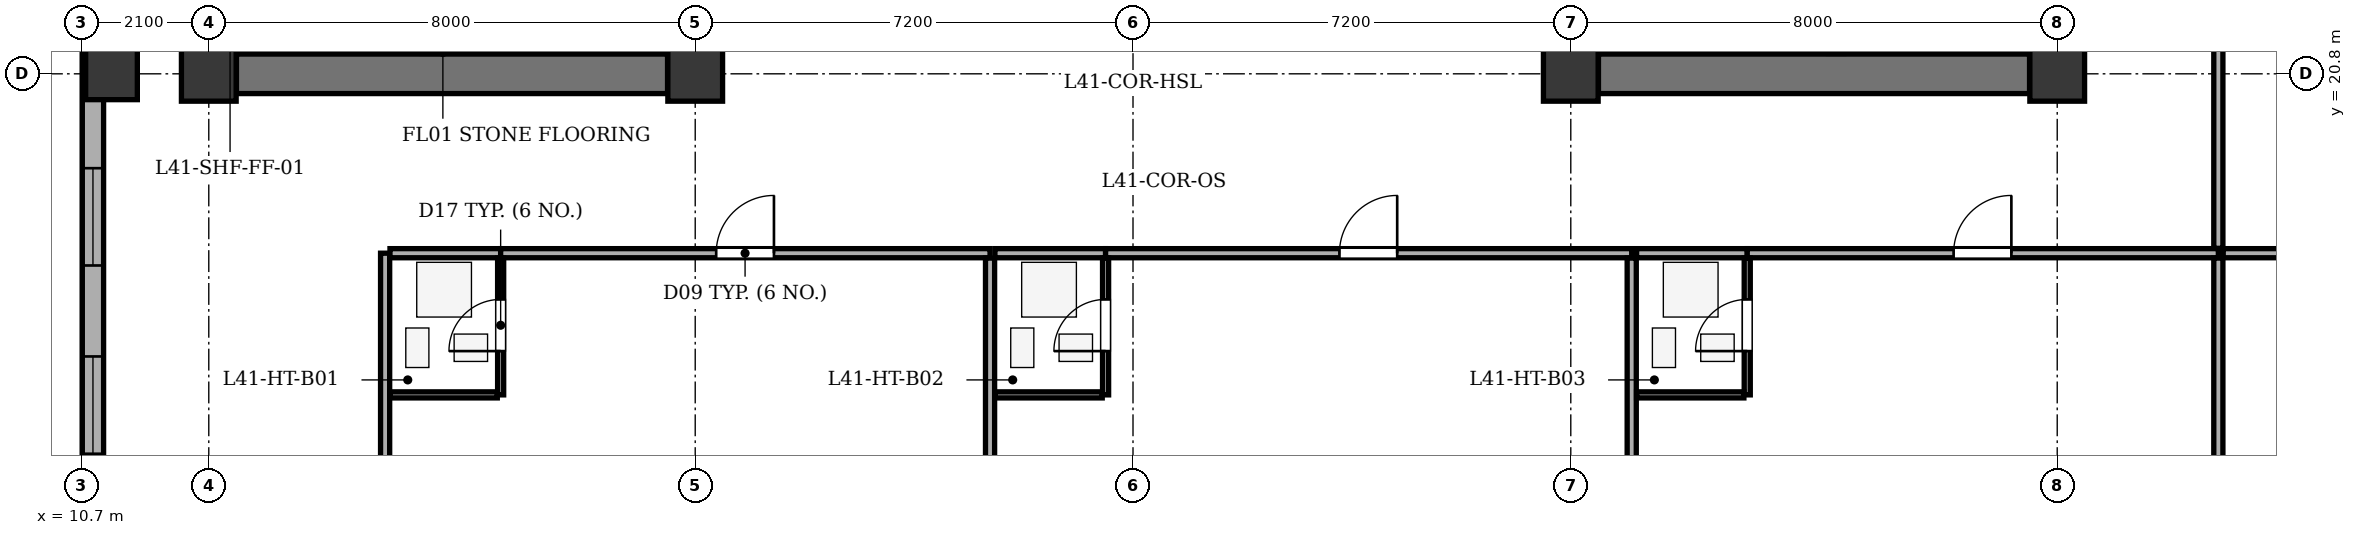
"""IFC4 building model, lengths in metres.
Left out: names, types, materials, properties, quantities, classifications, styles, units other than length and angle.
Written with IfcOpenShell. Run it as: python <this file> out.ifc"""

import sys

from ifc_helpers import new_model, si_unit, direction, frame, frame_2d, origin, origin_2d, place, context, subcontext, project, spatial, rectangle, extrude, element, fill, save


model = new_model("IFC4")
c1 = context("Model", 3, precision=1e-05, world=origin(), true_north=direction((0.0, 1.0)))
c2 = subcontext(c1, "Body", "Model", "MODEL_VIEW")
j1 = project(units=[si_unit("LENGTHUNIT", "METRE"), si_unit("PLANEANGLEUNIT", "RADIAN")], contexts=[c1])
p1 = place(None, origin())
s1 = spatial("IfcSite", under=j1, at=p1, CompositionType="ELEMENT")
p2 = place(p1, origin())
s2 = spatial("IfcBuilding", under=s1, at=p2, CompositionType="ELEMENT")
p3 = place(p2, frame((0.0, 0.0, 162.3)))
s3 = spatial("IfcBuildingStorey", under=s2, at=p3, CompositionType="ELEMENT", Elevation=162.3)
for number, where, z_axis, x_axis in (
    (1, (12.8, 20.8, 0.0), (0.0, 0.0, 1.0), (1.0, 0.0, 0.0)),
    (2, (20.8, 20.8, 0.0), (0.0, 0.0, 1.0), (1.0, 0.0, 0.0)),
    (3, (35.2, 20.8, 0.0), (0.0, 0.0, 1.0), (1.0, 0.0, 0.0)),
    (4, (43.2, 20.8, 0.0), (0.0, 0.0, 1.0), (1.0, 0.0, 0.0)),
):
    element("IfcColumn", number, at=place(p3, frame(where, z_axis=z_axis, x_axis=x_axis)), inside=s3, PredefinedType="COLUMN", context=c2, shape_type="SweptSolid", body=[
        extrude(rectangle(XDim=0.9, YDim=0.9, at=origin_2d()), origin(), (0.0, 0.0, 1.0), 3.5),
    ])
p4 = place(p3, frame((11.2, 20.8, 0.0), z_axis=(0.0, 0.0, 1.0), x_axis=(1.0, 0.0, 0.0)))
e5 = element("IfcColumn", 5, at=p4, inside=s3, PredefinedType="COLUMN", context=c2, shape_type="SweptSolid", body=[
    extrude(rectangle(XDim=0.85, YDim=0.85, at=origin_2d()), origin(), (0.0, 0.0, 1.0), 3.5),
])
p5 = place(p3, frame((10.895, 12.9, 0.0), z_axis=(0.0, 0.0, 1.0), x_axis=(0.0, 1.0, 0.0)))
e6 = element("IfcWall", 6, at=p5, inside=s3, PredefinedType="STANDARD", context=c2, shape_type="SweptSolid", body=[
    extrude(rectangle(XDim=35.0, YDim=0.35, at=frame_2d((17.5, 0.0))), origin(), (0.0, 0.0, 1.0), 2.785),
])
p6 = place(p5, frame((1.652, 0.0, 0.75)))
e7 = element("IfcOpeningElement", 7, at=p6, cuts=e6, PredefinedType="OPENING", context=c2, shape_type="SweptSolid", body=[
    extrude(rectangle(XDim=1.6, YDim=1.75, at=frame_2d((0.8, 0.875))), frame((0.0, 0.185, 0.0), z_axis=(0.0, -1.0, 0.0), x_axis=(1.0, 0.0, 0.0)), (0.0, 0.0, 1.0), 0.37),
])
p7 = place(p5, frame((4.748, 0.0, 0.75)))
e8 = element("IfcOpeningElement", 8, at=p7, cuts=e6, PredefinedType="OPENING", context=c2, shape_type="SweptSolid", body=[
    extrude(rectangle(XDim=1.6, YDim=1.75, at=frame_2d((0.8, 0.875))), frame((0.0, 0.185, 0.0), z_axis=(0.0, -1.0, 0.0), x_axis=(1.0, 0.0, 0.0)), (0.0, 0.0, 1.0), 0.37),
])
p8 = place(p5, frame((10.752, 0.0, 0.75)))
e9 = element("IfcOpeningElement", 9, at=p8, cuts=e6, PredefinedType="OPENING", context=c2, shape_type="SweptSolid", body=[
    extrude(rectangle(XDim=1.6, YDim=1.75, at=frame_2d((0.8, 0.875))), frame((0.0, 0.185, 0.0), z_axis=(0.0, -1.0, 0.0), x_axis=(1.0, 0.0, 0.0)), (0.0, 0.0, 1.0), 0.37),
])
p9 = place(p5, frame((15.998, 0.0, 0.75)))
e10 = element("IfcOpeningElement", 10, at=p9, cuts=e6, PredefinedType="OPENING", context=c2, shape_type="SweptSolid", body=[
    extrude(rectangle(XDim=2.1, YDim=1.75, at=frame_2d((1.05, 0.875))), frame((0.0, 0.185, 0.0), z_axis=(0.0, -1.0, 0.0), x_axis=(1.0, 0.0, 0.0)), (0.0, 0.0, 1.0), 0.37),
])
p10 = place(p5, frame((23.916, 0.0, 0.75)))
e11 = element("IfcOpeningElement", 11, at=p10, cuts=e6, PredefinedType="OPENING", context=c2, shape_type="SweptSolid", body=[
    extrude(rectangle(XDim=1.6, YDim=1.75, at=frame_2d((0.8, 0.875))), frame((0.0, 0.185, 0.0), z_axis=(0.0, -1.0, 0.0), x_axis=(1.0, 0.0, 0.0)), (0.0, 0.0, 1.0), 0.37),
])
p11 = place(p5, frame((29.834, 0.0, 0.75)))
e12 = element("IfcOpeningElement", 12, at=p11, cuts=e6, PredefinedType="OPENING", context=c2, shape_type="SweptSolid", body=[
    extrude(rectangle(XDim=2.1, YDim=1.75, at=frame_2d((1.05, 0.875))), frame((0.0, 0.185, 0.0), z_axis=(0.0, -1.0, 0.0), x_axis=(1.0, 0.0, 0.0)), (0.0, 0.0, 1.0), 0.37),
])
p12 = place(p3, frame((13.255, 20.8, 0.0), z_axis=(0.0, 0.0, 1.0), x_axis=(1.0, 0.0, 0.0)))
e13 = element("IfcWall", 13, at=p12, inside=s3, PredefinedType="SHEAR", context=c2, shape_type="SweptSolid", body=[
    extrude(rectangle(XDim=7.09, YDim=0.65, at=frame_2d((3.545, 0.0))), origin(), (0.0, 0.0, 1.0), 3.2),
])
p13 = place(p3, frame((16.435, 21.135, 0.0), z_axis=(0.0, 0.0, 1.0), x_axis=(0.0, 1.0, 0.0)))
e14 = element("IfcWall", 14, at=p13, inside=s3, PredefinedType="SHEAR", context=c2, shape_type="SweptSolid", body=[
    extrude(rectangle(XDim=12.13, YDim=0.25, at=frame_2d((6.065, 0.0))), origin(), (0.0, 0.0, 1.0), 3.2),
])
p14 = place(p13, frame((0.515, 0.0, 0.0)))
e15 = element("IfcOpeningElement", 15, at=p14, cuts=e14, PredefinedType="OPENING", context=c2, shape_type="SweptSolid", body=[
    extrude(rectangle(XDim=1.2, YDim=2.15, at=frame_2d((0.6, 1.075))), frame((0.0, 0.135, 0.0), z_axis=(0.0, -1.0, 0.0), x_axis=(1.0, 0.0, 0.0)), (0.0, 0.0, 1.0), 0.27),
])
p15 = place(p13, frame((2.665, 0.0, 0.0)))
e16 = element("IfcOpeningElement", 16, at=p15, cuts=e14, PredefinedType="OPENING", context=c2, shape_type="SweptSolid", body=[
    extrude(rectangle(XDim=1.15, YDim=2.15, at=frame_2d((0.575, 1.075))), frame((0.0, 0.135, 0.0), z_axis=(0.0, -1.0, 0.0), x_axis=(1.0, 0.0, 0.0)), (0.0, 0.0, 1.0), 0.27),
])
p16 = place(p3, frame((35.655, 20.8, 0.0), z_axis=(0.0, 0.0, 1.0), x_axis=(1.0, 0.0, 0.0)))
e17 = element("IfcWall", 17, at=p16, inside=s3, PredefinedType="SHEAR", context=c2, shape_type="SweptSolid", body=[
    extrude(rectangle(XDim=7.09, YDim=0.65, at=frame_2d((3.545, 0.0))), origin(), (0.0, 0.0, 1.0), 3.2),
])
p17 = place(p3, frame((39.565, 21.135, 0.0), z_axis=(0.0, 0.0, 1.0), x_axis=(0.0, 1.0, 0.0)))
e18 = element("IfcWall", 18, at=p17, inside=s3, PredefinedType="SHEAR", context=c2, shape_type="SweptSolid", body=[
    extrude(rectangle(XDim=12.13, YDim=0.25, at=frame_2d((6.065, 0.0))), origin(), (0.0, 0.0, 1.0), 3.2),
])
p18 = place(p17, frame((0.515, 0.0, 0.0)))
e19 = element("IfcOpeningElement", 19, at=p18, cuts=e18, PredefinedType="OPENING", context=c2, shape_type="SweptSolid", body=[
    extrude(rectangle(XDim=1.2, YDim=2.15, at=frame_2d((0.6, 1.075))), frame((0.0, 0.135, 0.0), z_axis=(0.0, -1.0, 0.0), x_axis=(1.0, 0.0, 0.0)), (0.0, 0.0, 1.0), 0.27),
])
p19 = place(p17, frame((2.665, 0.0, 0.0)))
e20 = element("IfcOpeningElement", 20, at=p19, cuts=e18, PredefinedType="OPENING", context=c2, shape_type="SweptSolid", body=[
    extrude(rectangle(XDim=1.15, YDim=2.15, at=frame_2d((0.575, 1.075))), frame((0.0, 0.135, 0.0), z_axis=(0.0, -1.0, 0.0), x_axis=(1.0, 0.0, 0.0)), (0.0, 0.0, 1.0), 0.27),
])
p20 = place(p3, frame((15.7, 8.275, 0.0), z_axis=(0.0, 0.0, 1.0), x_axis=(0.0, 1.0, 0.0)))
e21 = element("IfcWall", 21, at=p20, inside=s3, PredefinedType="PARTITIONING", context=c2, shape_type="SweptSolid", body=[
    extrude(rectangle(XDim=9.575, YDim=0.15, at=frame_2d((4.788, 0.0))), origin(), (0.0, 0.0, 1.0), 3.2),
])
p21 = place(p3, frame((15.78, 17.85, 0.0), z_axis=(0.0, 0.0, 1.0), x_axis=(1.0, 0.0, 0.0)))
e22 = element("IfcWall", 22, at=p21, inside=s3, PredefinedType="PARTITIONING", context=c2, shape_type="SweptSolid", body=[
    extrude(rectangle(XDim=1.82, YDim=0.15, at=frame_2d((0.91, 0.0))), origin(), (0.0, 0.0, 1.0), 3.2),
])
p22 = place(p3, frame((17.6, 17.85, 0.0), z_axis=(0.0, 0.0, 1.0), x_axis=(1.0, 0.0, 0.0)))
e23 = element("IfcWall", 23, at=p22, inside=s3, PredefinedType="PARTITIONING", context=c2, shape_type="SweptSolid", body=[
    extrude(rectangle(XDim=8.049, YDim=0.15, at=frame_2d((4.024, 0.0))), origin(), (0.0, 0.0, 1.0), 3.2),
])
p23 = place(p22, frame((3.545, 0.0, 0.0)))
e24 = element("IfcOpeningElement", 24, at=p23, cuts=e23, PredefinedType="OPENING", context=c2, shape_type="SweptSolid", body=[
    extrude(rectangle(XDim=0.95, YDim=2.1, at=frame_2d((0.475, 1.05))), frame((0.0, 0.085, 0.0), z_axis=(0.0, -1.0, 0.0), x_axis=(1.0, 0.0, 0.0)), (0.0, 0.0, 1.0), 0.17),
])
p24 = place(p3, frame((17.6, 15.52, 0.0), z_axis=(0.0, 0.0, 1.0), x_axis=(0.0, 1.0, 0.0)))
e25 = element("IfcWall", 25, at=p24, inside=s3, PredefinedType="PARTITIONING", context=c2, shape_type="SweptSolid", body=[
    extrude(rectangle(XDim=2.25, YDim=0.1, at=frame_2d((1.125, 0.0))), origin(), (0.0, 0.0, 1.0), 3.2),
])
p25 = place(p24, frame((0.72, 0.0, 0.0)))
e26 = element("IfcOpeningElement", 26, at=p25, cuts=e25, PredefinedType="OPENING", context=c2, shape_type="SweptSolid", body=[
    extrude(rectangle(XDim=0.85, YDim=2.05, at=frame_2d((0.425, 1.025))), frame((0.0, 0.06, 0.0), z_axis=(0.0, -1.0, 0.0), x_axis=(1.0, 0.0, 0.0)), (0.0, 0.0, 1.0), 0.12),
])
p26 = place(p3, frame((15.78, 15.52, 0.0), z_axis=(0.0, 0.0, 1.0), x_axis=(1.0, 0.0, 0.0)))
e27 = element("IfcWall", 27, at=p26, inside=s3, PredefinedType="PARTITIONING", context=c2, shape_type="SweptSolid", body=[
    extrude(rectangle(XDim=1.765, YDim=0.1, at=frame_2d((0.882, 0.0))), origin(), (0.0, 0.0, 1.0), 3.2),
])
p27 = place(p3, frame((25.649, 8.275, 0.0), z_axis=(0.0, 0.0, 1.0), x_axis=(0.0, 1.0, 0.0)))
e28 = element("IfcWall", 28, at=p27, inside=s3, PredefinedType="PARTITIONING", context=c2, shape_type="SweptSolid", body=[
    extrude(rectangle(XDim=9.495, YDim=0.15, at=frame_2d((4.748, 0.0))), origin(), (0.0, 0.0, 1.0), 3.2),
])
p28 = place(p3, frame((25.729, 17.85, 0.0), z_axis=(0.0, 0.0, 1.0), x_axis=(1.0, 0.0, 0.0)))
e29 = element("IfcWall", 29, at=p28, inside=s3, PredefinedType="PARTITIONING", context=c2, shape_type="SweptSolid", body=[
    extrude(rectangle(XDim=1.82, YDim=0.15, at=frame_2d((0.91, 0.0))), origin(), (0.0, 0.0, 1.0), 3.2),
])
p29 = place(p3, frame((27.549, 17.85, 0.0), z_axis=(0.0, 0.0, 1.0), x_axis=(1.0, 0.0, 0.0)))
e30 = element("IfcWall", 30, at=p29, inside=s3, PredefinedType="PARTITIONING", context=c2, shape_type="SweptSolid", body=[
    extrude(rectangle(XDim=8.653, YDim=0.15, at=frame_2d((4.326, 0.0))), origin(), (0.0, 0.0, 1.0), 3.2),
])
p30 = place(p29, frame((3.846, 0.0, 0.0)))
e31 = element("IfcOpeningElement", 31, at=p30, cuts=e30, PredefinedType="OPENING", context=c2, shape_type="SweptSolid", body=[
    extrude(rectangle(XDim=0.95, YDim=2.1, at=frame_2d((0.475, 1.05))), frame((0.0, 0.085, 0.0), z_axis=(0.0, -1.0, 0.0), x_axis=(1.0, 0.0, 0.0)), (0.0, 0.0, 1.0), 0.17),
])
p31 = place(p3, frame((27.549, 15.52, 0.0), z_axis=(0.0, 0.0, 1.0), x_axis=(0.0, 1.0, 0.0)))
e32 = element("IfcWall", 32, at=p31, inside=s3, PredefinedType="PARTITIONING", context=c2, shape_type="SweptSolid", body=[
    extrude(rectangle(XDim=2.25, YDim=0.1, at=frame_2d((1.125, 0.0))), origin(), (0.0, 0.0, 1.0), 3.2),
])
p32 = place(p31, frame((0.72, 0.0, 0.0)))
e33 = element("IfcOpeningElement", 33, at=p32, cuts=e32, PredefinedType="OPENING", context=c2, shape_type="SweptSolid", body=[
    extrude(rectangle(XDim=0.85, YDim=2.05, at=frame_2d((0.425, 1.025))), frame((0.0, 0.06, 0.0), z_axis=(0.0, -1.0, 0.0), x_axis=(1.0, 0.0, 0.0)), (0.0, 0.0, 1.0), 0.12),
])
p33 = place(p3, frame((25.729, 15.52, 0.0), z_axis=(0.0, 0.0, 1.0), x_axis=(1.0, 0.0, 0.0)))
e34 = element("IfcWall", 34, at=p33, inside=s3, PredefinedType="PARTITIONING", context=c2, shape_type="SweptSolid", body=[
    extrude(rectangle(XDim=1.765, YDim=0.1, at=frame_2d((0.882, 0.0))), origin(), (0.0, 0.0, 1.0), 3.2),
])
p34 = place(p3, frame((36.202, 8.275, 0.0), z_axis=(0.0, 0.0, 1.0), x_axis=(0.0, 1.0, 0.0)))
e35 = element("IfcWall", 35, at=p34, inside=s3, PredefinedType="PARTITIONING", context=c2, shape_type="SweptSolid", body=[
    extrude(rectangle(XDim=9.495, YDim=0.15, at=frame_2d((4.748, 0.0))), origin(), (0.0, 0.0, 1.0), 3.2),
])
p35 = place(p3, frame((36.282, 17.85, 0.0), z_axis=(0.0, 0.0, 1.0), x_axis=(1.0, 0.0, 0.0)))
e36 = element("IfcWall", 36, at=p35, inside=s3, PredefinedType="PARTITIONING", context=c2, shape_type="SweptSolid", body=[
    extrude(rectangle(XDim=1.82, YDim=0.15, at=frame_2d((0.91, 0.0))), origin(), (0.0, 0.0, 1.0), 3.2),
])
p36 = place(p3, frame((38.102, 17.85, 0.0), z_axis=(0.0, 0.0, 1.0), x_axis=(1.0, 0.0, 0.0)))
e37 = element("IfcWall", 37, at=p36, inside=s3, PredefinedType="PARTITIONING", context=c2, shape_type="SweptSolid", body=[
    extrude(rectangle(XDim=7.748, YDim=0.15, at=frame_2d((3.874, 0.0))), origin(), (0.0, 0.0, 1.0), 3.2),
])
p37 = place(p36, frame((3.394, 0.0, 0.0)))
e38 = element("IfcOpeningElement", 38, at=p37, cuts=e37, PredefinedType="OPENING", context=c2, shape_type="SweptSolid", body=[
    extrude(rectangle(XDim=0.95, YDim=2.1, at=frame_2d((0.475, 1.05))), frame((0.0, 0.085, 0.0), z_axis=(0.0, -1.0, 0.0), x_axis=(1.0, 0.0, 0.0)), (0.0, 0.0, 1.0), 0.17),
])
p38 = place(p3, frame((38.102, 15.52, 0.0), z_axis=(0.0, 0.0, 1.0), x_axis=(0.0, 1.0, 0.0)))
e39 = element("IfcWall", 39, at=p38, inside=s3, PredefinedType="PARTITIONING", context=c2, shape_type="SweptSolid", body=[
    extrude(rectangle(XDim=2.25, YDim=0.1, at=frame_2d((1.125, 0.0))), origin(), (0.0, 0.0, 1.0), 3.2),
])
p39 = place(p38, frame((0.72, 0.0, 0.0)))
e40 = element("IfcOpeningElement", 40, at=p39, cuts=e39, PredefinedType="OPENING", context=c2, shape_type="SweptSolid", body=[
    extrude(rectangle(XDim=0.85, YDim=2.05, at=frame_2d((0.425, 1.025))), frame((0.0, 0.06, 0.0), z_axis=(0.0, -1.0, 0.0), x_axis=(1.0, 0.0, 0.0)), (0.0, 0.0, 1.0), 0.12),
])
p40 = place(p3, frame((36.282, 15.52, 0.0), z_axis=(0.0, 0.0, 1.0), x_axis=(1.0, 0.0, 0.0)))
e41 = element("IfcWall", 41, at=p40, inside=s3, PredefinedType="PARTITIONING", context=c2, shape_type="SweptSolid", body=[
    extrude(rectangle(XDim=1.765, YDim=0.1, at=frame_2d((0.883, 0.0))), origin(), (0.0, 0.0, 1.0), 3.2),
])
p41 = place(p3, frame((45.85, 8.275, 0.0), z_axis=(0.0, 0.0, 1.0), x_axis=(0.0, 1.0, 0.0)))
e42 = element("IfcWall", 42, at=p41, inside=s3, PredefinedType="PARTITIONING", context=c2, shape_type="SweptSolid", body=[
    extrude(rectangle(XDim=9.495, YDim=0.15, at=frame_2d((4.748, 0.0))), origin(), (0.0, 0.0, 1.0), 3.2),
])
p42 = place(p3, frame((45.93, 17.85, 0.0), z_axis=(0.0, 0.0, 1.0), x_axis=(1.0, 0.0, 0.0)))
e43 = element("IfcWall", 43, at=p42, inside=s3, PredefinedType="PARTITIONING", context=c2, shape_type="SweptSolid", body=[
    extrude(rectangle(XDim=9.395, YDim=0.15, at=frame_2d((4.698, 0.0))), origin(), (0.0, 0.0, 1.0), 3.2),
])
p43 = place(p3, frame((45.85, 17.93, 0.0), z_axis=(0.0, 0.0, 1.0), x_axis=(0.0, 1.0, 0.0)))
e44 = element("IfcWall", 44, at=p43, inside=s3, PredefinedType="PARTITIONING", context=c2, shape_type="SweptSolid", body=[
    extrude(rectangle(XDim=18.54, YDim=0.15, at=frame_2d((9.27, 0.0))), origin(), (0.0, 0.0, 1.0), 3.2),
])
p44 = place(p43, frame((8.79, 0.0, 0.0)))
e45 = element("IfcOpeningElement", 45, at=p44, cuts=e44, PredefinedType="OPENING", context=c2, shape_type="SweptSolid", body=[
    extrude(rectangle(XDim=0.95, YDim=2.1, at=frame_2d((0.475, 1.05))), frame((0.0, 0.085, 0.0), z_axis=(0.0, -1.0, 0.0), x_axis=(1.0, 0.0, 0.0)), (0.0, 0.0, 1.0), 0.17),
])
p45 = place(p6, origin())
e46 = element("IfcWindow", 46, at=p45, inside=s3, PartitioningType="SINGLE_PANEL", PredefinedType="WINDOW", context=c2, shape_type="SweptSolid", body=[
    extrude(rectangle(XDim=1.6, YDim=1.75, at=frame_2d((0.8, 0.875))), frame((0.0, -0.01, 0.0), z_axis=(0.0, -1.0, 0.0), x_axis=(1.0, 0.0, 0.0)), (0.0, 0.0, 1.0), 0.06),
])
fill(e7, e46)
p46 = place(p7, origin())
e47 = element("IfcWindow", 47, at=p46, inside=s3, PartitioningType="SINGLE_PANEL", PredefinedType="WINDOW", context=c2, shape_type="SweptSolid", body=[
    extrude(rectangle(XDim=1.6, YDim=1.75, at=frame_2d((0.8, 0.875))), frame((0.0, -0.01, 0.0), z_axis=(0.0, -1.0, 0.0), x_axis=(1.0, 0.0, 0.0)), (0.0, 0.0, 1.0), 0.06),
])
fill(e8, e47)
p47 = place(p25, origin())
e48 = element("IfcDoor", 48, at=p47, inside=s3, OperationType="SINGLE_SWING_LEFT", PredefinedType="DOOR", context=c2, shape_type="SweptSolid", body=[
    extrude(rectangle(XDim=0.85, YDim=2.05, at=frame_2d((0.425, 1.025))), frame((0.0, 0.025, 0.0), z_axis=(0.0, -1.0, 0.0), x_axis=(1.0, 0.0, 0.0)), (0.0, 0.0, 1.0), 0.05),
])
fill(e26, e48)
p48 = place(p23, origin())
e49 = element("IfcDoor", 49, at=p48, inside=s3, OperationType="SINGLE_SWING_RIGHT", PredefinedType="DOOR", context=c2, shape_type="SweptSolid", body=[
    extrude(rectangle(XDim=0.95, YDim=2.1, at=frame_2d((0.475, 1.05))), frame((0.0, 0.025, 0.0), z_axis=(0.0, -1.0, 0.0), x_axis=(1.0, 0.0, 0.0)), (0.0, 0.0, 1.0), 0.05),
])
fill(e24, e49)
p49 = place(p32, origin())
e50 = element("IfcDoor", 50, at=p49, inside=s3, OperationType="SINGLE_SWING_LEFT", PredefinedType="DOOR", context=c2, shape_type="SweptSolid", body=[
    extrude(rectangle(XDim=0.85, YDim=2.05, at=frame_2d((0.425, 1.025))), frame((0.0, 0.025, 0.0), z_axis=(0.0, -1.0, 0.0), x_axis=(1.0, 0.0, 0.0)), (0.0, 0.0, 1.0), 0.05),
])
fill(e33, e50)
p50 = place(p30, origin())
e51 = element("IfcDoor", 51, at=p50, inside=s3, OperationType="SINGLE_SWING_RIGHT", PredefinedType="DOOR", context=c2, shape_type="SweptSolid", body=[
    extrude(rectangle(XDim=0.95, YDim=2.1, at=frame_2d((0.475, 1.05))), frame((0.0, 0.025, 0.0), z_axis=(0.0, -1.0, 0.0), x_axis=(1.0, 0.0, 0.0)), (0.0, 0.0, 1.0), 0.05),
])
fill(e31, e51)
p51 = place(p39, origin())
e52 = element("IfcDoor", 52, at=p51, inside=s3, OperationType="SINGLE_SWING_LEFT", PredefinedType="DOOR", context=c2, shape_type="SweptSolid", body=[
    extrude(rectangle(XDim=0.85, YDim=2.05, at=frame_2d((0.425, 1.025))), frame((0.0, 0.025, 0.0), z_axis=(0.0, -1.0, 0.0), x_axis=(1.0, 0.0, 0.0)), (0.0, 0.0, 1.0), 0.05),
])
fill(e40, e52)
p52 = place(p37, origin())
e53 = element("IfcDoor", 53, at=p52, inside=s3, OperationType="SINGLE_SWING_RIGHT", PredefinedType="DOOR", context=c2, shape_type="SweptSolid", body=[
    extrude(rectangle(XDim=0.95, YDim=2.1, at=frame_2d((0.475, 1.05))), frame((0.0, 0.025, 0.0), z_axis=(0.0, -1.0, 0.0), x_axis=(1.0, 0.0, 0.0)), (0.0, 0.0, 1.0), 0.05),
])
fill(e38, e53)
save(model, sys.argv[1])
